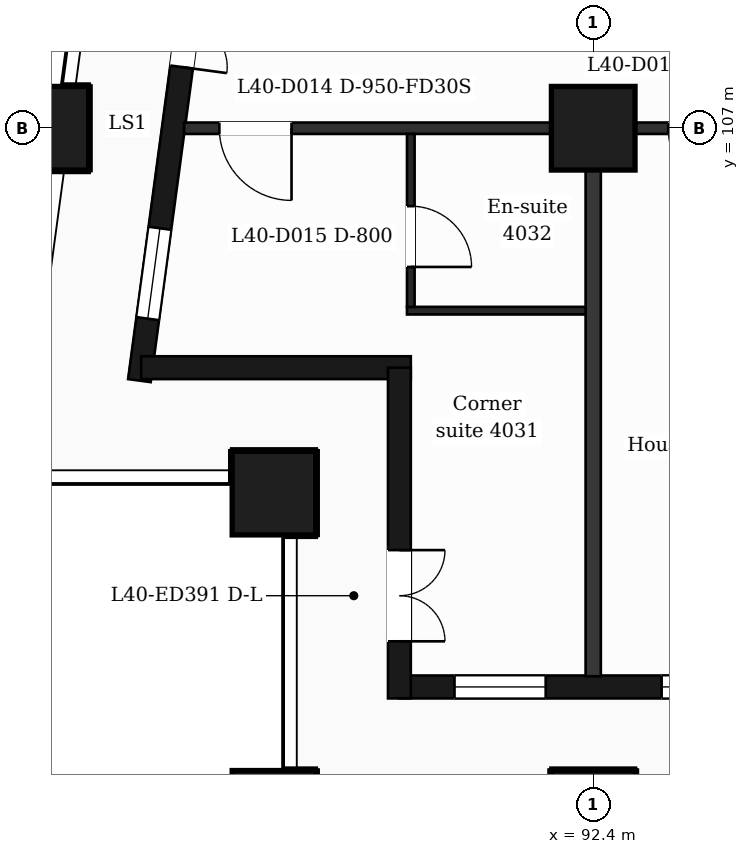
"""IFC4 building model, lengths in metres.
Left out: names, types, materials, properties, quantities, classifications, styles, units other than length and angle.
Written with IfcOpenShell. Run it as: python <this file> out.ifc"""

import sys

from ifc_helpers import new_model, si_unit, direction, frame, frame_2d, origin, origin_2d, place, context, subcontext, project, spatial, rectangle, extrude, element, fill, save


model = new_model("IFC4")
c1 = context("Model", 3, precision=1e-05, world=origin(), true_north=direction((0.0, 1.0)))
c2 = subcontext(c1, "Body", "Model", "MODEL_VIEW")
j1 = project(units=[si_unit("LENGTHUNIT", "METRE"), si_unit("PLANEANGLEUNIT", "RADIAN")], contexts=[c1])
p1 = place(None, origin())
s1 = spatial("IfcSite", under=j1, at=p1, CompositionType="ELEMENT")
p2 = place(p1, origin())
s2 = spatial("IfcBuilding", under=s1, at=p2, CompositionType="ELEMENT")
p3 = place(p2, frame((0.0, 0.0, 170.0)))
s3 = spatial("IfcBuildingStorey", under=s2, at=p3, CompositionType="ELEMENT", Elevation=170.0)
for number, where, z_axis, x_axis in (
    (1, (92.4, 98.0, 0.0), (0.0, 0.0, 1.0), (1.0, 0.0, 0.0)),
    (2, (88.2, 98.0, 0.0), (0.0, 0.0, 1.0), (1.0, 0.0, 0.0)),
    (3, (88.2, 102.2, 0.0), (0.0, 0.0, 1.0), (1.0, 0.0, 0.0)),
    (4, (92.4, 107.0, 0.0), (0.0, 0.0, 1.0), (1.0, 0.0, 0.0)),
    (5, (85.211, 107.0, 0.0), (0.0, 0.0, 1.0), (1.0, 0.0, 0.0)),
):
    element("IfcColumn", number, at=place(p3, frame(where, z_axis=z_axis, x_axis=x_axis)), inside=s3, PredefinedType="COLUMN", context=c2, shape_type="SweptSolid", body=[
        extrude(rectangle(XDim=1.1, YDim=1.1, at=origin_2d()), origin(), (0.0, 0.0, 1.0), 3.7),
    ])
p4 = place(p3, frame((89.85, 99.65, 0.0), z_axis=(0.0, 0.0, 1.0), x_axis=(1.0, 0.0, 0.0)))
e6 = element("IfcWall", 6, at=p4, inside=s3, PredefinedType="SOLIDWALL", context=c2, shape_type="SweptSolid", body=[
    extrude(rectangle(XDim=47.25, YDim=0.3, at=frame_2d((23.625, 0.0))), origin(), (0.0, 0.0, 1.0), 3.38),
])
p5 = place(p4, frame((0.725, 0.0, 0.9)))
e7 = element("IfcOpeningElement", 7, at=p5, cuts=e6, PredefinedType="OPENING", context=c2, shape_type="SweptSolid", body=[
    extrude(rectangle(XDim=1.2, YDim=2.1, at=frame_2d((0.6, 1.05))), frame((0.0, 0.16, 0.0), z_axis=(0.0, -1.0, 0.0), x_axis=(1.0, 0.0, 0.0)), (0.0, 0.0, 1.0), 0.32),
])
p6 = place(p4, frame((3.45, 0.0, 0.9)))
e8 = element("IfcOpeningElement", 8, at=p6, cuts=e6, PredefinedType="OPENING", context=c2, shape_type="SweptSolid", body=[
    extrude(rectangle(XDim=2.4, YDim=2.1, at=frame_2d((1.2, 1.05))), frame((0.0, 0.16, 0.0), z_axis=(0.0, -1.0, 0.0), x_axis=(1.0, 0.0, 0.0)), (0.0, 0.0, 1.0), 0.32),
])
p7 = place(p4, frame((7.65, 0.0, 0.9)))
e9 = element("IfcOpeningElement", 9, at=p7, cuts=e6, PredefinedType="OPENING", context=c2, shape_type="SweptSolid", body=[
    extrude(rectangle(XDim=2.4, YDim=2.1, at=frame_2d((1.2, 1.05))), frame((0.0, 0.16, 0.0), z_axis=(0.0, -1.0, 0.0), x_axis=(1.0, 0.0, 0.0)), (0.0, 0.0, 1.0), 0.32),
])
p8 = place(p4, frame((12.45, 0.0, 0.9)))
e10 = element("IfcOpeningElement", 10, at=p8, cuts=e6, PredefinedType="OPENING", context=c2, shape_type="SweptSolid", body=[
    extrude(rectangle(XDim=1.2, YDim=2.1, at=frame_2d((0.6, 1.05))), frame((0.0, 0.16, 0.0), z_axis=(0.0, -1.0, 0.0), x_axis=(1.0, 0.0, 0.0)), (0.0, 0.0, 1.0), 0.32),
])
p9 = place(p4, frame((16.65, 0.0, 0.9)))
e11 = element("IfcOpeningElement", 11, at=p9, cuts=e6, PredefinedType="OPENING", context=c2, shape_type="SweptSolid", body=[
    extrude(rectangle(XDim=1.2, YDim=2.1, at=frame_2d((0.6, 1.05))), frame((0.0, 0.16, 0.0), z_axis=(0.0, -1.0, 0.0), x_axis=(1.0, 0.0, 0.0)), (0.0, 0.0, 1.0), 0.32),
])
p10 = place(p4, frame((19.95, 0.0, 0.0)))
e12 = element("IfcOpeningElement", 12, at=p10, cuts=e6, PredefinedType="OPENING", context=c2, shape_type="SweptSolid", body=[
    extrude(rectangle(XDim=1.2, YDim=2.4, at=frame_2d((0.6, 1.2))), frame((0.0, 0.16, 0.0), z_axis=(0.0, -1.0, 0.0), x_axis=(1.0, 0.0, 0.0)), (0.0, 0.0, 1.0), 0.32),
])
p11 = place(p4, frame((21.75, 0.0, 0.9)))
e13 = element("IfcOpeningElement", 13, at=p11, cuts=e6, PredefinedType="OPENING", context=c2, shape_type="SweptSolid", body=[
    extrude(rectangle(XDim=1.2, YDim=2.1, at=frame_2d((0.6, 1.05))), frame((0.0, 0.16, 0.0), z_axis=(0.0, -1.0, 0.0), x_axis=(1.0, 0.0, 0.0)), (0.0, 0.0, 1.0), 0.32),
])
p12 = place(p4, frame((24.45, 0.0, 0.9)))
e14 = element("IfcOpeningElement", 14, at=p12, cuts=e6, PredefinedType="OPENING", context=c2, shape_type="SweptSolid", body=[
    extrude(rectangle(XDim=2.4, YDim=2.1, at=frame_2d((1.2, 1.05))), frame((0.0, 0.16, 0.0), z_axis=(0.0, -1.0, 0.0), x_axis=(1.0, 0.0, 0.0)), (0.0, 0.0, 1.0), 0.32),
])
p13 = place(p4, frame((28.35, 0.0, 0.0)))
e15 = element("IfcOpeningElement", 15, at=p13, cuts=e6, PredefinedType="OPENING", context=c2, shape_type="SweptSolid", body=[
    extrude(rectangle(XDim=1.2, YDim=2.4, at=frame_2d((0.6, 1.2))), frame((0.0, 0.16, 0.0), z_axis=(0.0, -1.0, 0.0), x_axis=(1.0, 0.0, 0.0)), (0.0, 0.0, 1.0), 0.32),
])
p14 = place(p4, frame((30.15, 0.0, 0.9)))
e16 = element("IfcOpeningElement", 16, at=p14, cuts=e6, PredefinedType="OPENING", context=c2, shape_type="SweptSolid", body=[
    extrude(rectangle(XDim=1.2, YDim=2.1, at=frame_2d((0.6, 1.05))), frame((0.0, 0.16, 0.0), z_axis=(0.0, -1.0, 0.0), x_axis=(1.0, 0.0, 0.0)), (0.0, 0.0, 1.0), 0.32),
])
p15 = place(p4, frame((32.85, 0.0, 0.9)))
e17 = element("IfcOpeningElement", 17, at=p15, cuts=e6, PredefinedType="OPENING", context=c2, shape_type="SweptSolid", body=[
    extrude(rectangle(XDim=2.4, YDim=2.1, at=frame_2d((1.2, 1.05))), frame((0.0, 0.16, 0.0), z_axis=(0.0, -1.0, 0.0), x_axis=(1.0, 0.0, 0.0)), (0.0, 0.0, 1.0), 0.32),
])
p16 = place(p4, frame((37.05, 0.0, 0.9)))
e18 = element("IfcOpeningElement", 18, at=p16, cuts=e6, PredefinedType="OPENING", context=c2, shape_type="SweptSolid", body=[
    extrude(rectangle(XDim=2.4, YDim=2.1, at=frame_2d((1.2, 1.05))), frame((0.0, 0.16, 0.0), z_axis=(0.0, -1.0, 0.0), x_axis=(1.0, 0.0, 0.0)), (0.0, 0.0, 1.0), 0.32),
])
p17 = place(p4, frame((41.85, 0.0, 0.9)))
e19 = element("IfcOpeningElement", 19, at=p17, cuts=e6, PredefinedType="OPENING", context=c2, shape_type="SweptSolid", body=[
    extrude(rectangle(XDim=1.2, YDim=2.1, at=frame_2d((0.6, 1.05))), frame((0.0, 0.16, 0.0), z_axis=(0.0, -1.0, 0.0), x_axis=(1.0, 0.0, 0.0)), (0.0, 0.0, 1.0), 0.32),
])
p18 = place(p4, frame((45.25, 0.0, 0.9)))
e20 = element("IfcOpeningElement", 20, at=p18, cuts=e6, PredefinedType="OPENING", context=c2, shape_type="SweptSolid", body=[
    extrude(rectangle(XDim=1.2, YDim=2.1, at=frame_2d((0.6, 1.05))), frame((0.0, 0.16, 0.0), z_axis=(0.0, -1.0, 0.0), x_axis=(1.0, 0.0, 0.0)), (0.0, 0.0, 1.0), 0.32),
])
p19 = place(p3, frame((87.334, 110.4, 0.0), z_axis=(0.0, 0.0, 1.0), x_axis=(-0.133437175554, -0.991057273915, 0.0)))
e21 = element("IfcWall", 21, at=p19, inside=s3, PredefinedType="SOLIDWALL", context=c2, shape_type="SweptSolid", body=[
    extrude(rectangle(XDim=6.781, YDim=0.3, at=frame_2d((3.39, 0.0))), origin(), (0.0, 0.0, 1.0), 3.38),
])
p20 = place(p19, frame((1.418, 0.0, 0.0)))
e22 = element("IfcOpeningElement", 22, at=p20, cuts=e21, PredefinedType="OPENING", context=c2, shape_type="SweptSolid", body=[
    extrude(rectangle(XDim=1.2, YDim=2.4, at=frame_2d((0.6, 1.2))), frame((0.0, 0.16, 0.0), z_axis=(0.0, -1.0, 0.0), x_axis=(1.0, 0.0, 0.0)), (0.0, 0.0, 1.0), 0.32),
])
p21 = place(p19, frame((4.758, 0.0, 0.9)))
e23 = element("IfcOpeningElement", 23, at=p21, cuts=e21, PredefinedType="OPENING", context=c2, shape_type="SweptSolid", body=[
    extrude(rectangle(XDim=1.2, YDim=2.1, at=frame_2d((0.6, 1.05))), frame((0.0, 0.16, 0.0), z_axis=(0.0, -1.0, 0.0), x_axis=(1.0, 0.0, 0.0)), (0.0, 0.0, 1.0), 0.32),
])
p22 = place(p3, frame((86.452, 103.85, 0.0), z_axis=(0.0, 0.0, 1.0), x_axis=(1.0, 0.0, 0.0)))
e24 = element("IfcWall", 24, at=p22, inside=s3, PredefinedType="SOLIDWALL", context=c2, shape_type="SweptSolid", body=[
    extrude(rectangle(XDim=3.548, YDim=0.3, at=frame_2d((1.774, 0.0))), origin(), (0.0, 0.0, 1.0), 3.38),
])
p23 = place(p3, frame((89.85, 103.85, 0.0), z_axis=(0.0, 0.0, 1.0), x_axis=(0.0, -1.0, 0.0)))
e25 = element("IfcWall", 25, at=p23, inside=s3, PredefinedType="SOLIDWALL", context=c2, shape_type="SweptSolid", body=[
    extrude(rectangle(XDim=4.35, YDim=0.3, at=frame_2d((2.175, 0.0))), origin(), (0.0, 0.0, 1.0), 3.38),
])
p24 = place(p23, frame((2.4, 0.0, 0.0)))
e26 = element("IfcOpeningElement", 26, at=p24, cuts=e25, PredefinedType="OPENING", context=c2, shape_type="SweptSolid", body=[
    extrude(rectangle(XDim=1.2, YDim=2.4, at=frame_2d((0.6, 1.2))), frame((0.0, 0.16, 0.0), z_axis=(0.0, -1.0, 0.0), x_axis=(1.0, 0.0, 0.0)), (0.0, 0.0, 1.0), 0.32),
])
p25 = place(p3, frame((89.95, 104.6, 0.0), z_axis=(0.0, 0.0, 1.0), x_axis=(1.0, 0.0, 0.0)))
e27 = element("IfcWall", 27, at=p25, inside=s3, PredefinedType="PARTITIONING", context=c2, shape_type="SweptSolid", body=[
    extrude(rectangle(XDim=2.45, YDim=0.1, at=frame_2d((1.225, 0.0))), origin(), (0.0, 0.0, 1.0), 3.38),
])
p26 = place(p3, frame((87.018, 107.0, 0.0), z_axis=(0.0, 0.0, 1.0), x_axis=(1.0, 0.0, 0.0)))
e28 = element("IfcWall", 28, at=p26, inside=s3, PredefinedType="PARTITIONING", context=c2, shape_type="SweptSolid", body=[
    extrude(rectangle(XDim=52.765, YDim=0.15, at=frame_2d((26.382, 0.0))), origin(), (0.0, 0.0, 1.0), 3.38),
])
p27 = place(p26, frame((0.463, 0.0, 0.0)))
e29 = element("IfcOpeningElement", 29, at=p27, cuts=e28, PredefinedType="OPENING", context=c2, shape_type="SweptSolid", body=[
    extrude(rectangle(XDim=0.95, YDim=2.1, at=frame_2d((0.475, 1.05))), frame((0.0, 0.085, 0.0), z_axis=(0.0, -1.0, 0.0), x_axis=(1.0, 0.0, 0.0)), (0.0, 0.0, 1.0), 0.17),
])
p28 = place(p26, frame((6.369, 0.0, 0.0)))
e30 = element("IfcOpeningElement", 30, at=p28, cuts=e28, PredefinedType="OPENING", context=c2, shape_type="SweptSolid", body=[
    extrude(rectangle(XDim=0.95, YDim=2.1, at=frame_2d((0.475, 1.05))), frame((0.0, 0.085, 0.0), z_axis=(0.0, -1.0, 0.0), x_axis=(1.0, 0.0, 0.0)), (0.0, 0.0, 1.0), 0.17),
])
p29 = place(p26, frame((9.857, 0.0, 0.0)))
e31 = element("IfcOpeningElement", 31, at=p29, cuts=e28, PredefinedType="OPENING", context=c2, shape_type="SweptSolid", body=[
    extrude(rectangle(XDim=0.95, YDim=2.1, at=frame_2d((0.475, 1.05))), frame((0.0, 0.085, 0.0), z_axis=(0.0, -1.0, 0.0), x_axis=(1.0, 0.0, 0.0)), (0.0, 0.0, 1.0), 0.17),
])
p30 = place(p26, frame((15.382, 0.0, 0.0)))
e32 = element("IfcOpeningElement", 32, at=p30, cuts=e28, PredefinedType="OPENING", context=c2, shape_type="SweptSolid", body=[
    extrude(rectangle(XDim=1.0, YDim=2.1, at=frame_2d((0.5, 1.05))), frame((0.0, 0.085, 0.0), z_axis=(0.0, -1.0, 0.0), x_axis=(1.0, 0.0, 0.0)), (0.0, 0.0, 1.0), 0.17),
])
p31 = place(p26, frame((24.932, 0.0, 0.0)))
e33 = element("IfcOpeningElement", 33, at=p31, cuts=e28, PredefinedType="OPENING", context=c2, shape_type="SweptSolid", body=[
    extrude(rectangle(XDim=1.0, YDim=2.1, at=frame_2d((0.5, 1.05))), frame((0.0, 0.085, 0.0), z_axis=(0.0, -1.0, 0.0), x_axis=(1.0, 0.0, 0.0)), (0.0, 0.0, 1.0), 0.17),
])
p32 = place(p26, frame((27.819, 0.0, 0.0)))
e34 = element("IfcOpeningElement", 34, at=p32, cuts=e28, PredefinedType="OPENING", context=c2, shape_type="SweptSolid", body=[
    extrude(rectangle(XDim=0.95, YDim=2.1, at=frame_2d((0.475, 1.05))), frame((0.0, 0.085, 0.0), z_axis=(0.0, -1.0, 0.0), x_axis=(1.0, 0.0, 0.0)), (0.0, 0.0, 1.0), 0.17),
])
p33 = place(p26, frame((42.012, 0.0, 0.0)))
e35 = element("IfcOpeningElement", 35, at=p33, cuts=e28, PredefinedType="OPENING", context=c2, shape_type="SweptSolid", body=[
    extrude(rectangle(XDim=1.0, YDim=2.1, at=frame_2d((0.5, 1.05))), frame((0.0, 0.085, 0.0), z_axis=(0.0, -1.0, 0.0), x_axis=(1.0, 0.0, 0.0)), (0.0, 0.0, 1.0), 0.17),
])
p34 = place(p26, frame((48.249, 0.0, 0.0)))
e36 = element("IfcOpeningElement", 36, at=p34, cuts=e28, PredefinedType="OPENING", context=c2, shape_type="SweptSolid", body=[
    extrude(rectangle(XDim=0.95, YDim=2.1, at=frame_2d((0.475, 1.05))), frame((0.0, 0.085, 0.0), z_axis=(0.0, -1.0, 0.0), x_axis=(1.0, 0.0, 0.0)), (0.0, 0.0, 1.0), 0.17),
])
p35 = place(p3, frame((90.0, 104.65, 0.0), z_axis=(0.0, 0.0, 1.0), x_axis=(0.0, 1.0, 0.0)))
e37 = element("IfcWall", 37, at=p35, inside=s3, PredefinedType="PARTITIONING", context=c2, shape_type="SweptSolid", body=[
    extrude(rectangle(XDim=2.275, YDim=0.1, at=frame_2d((1.138, 0.0))), origin(), (0.0, 0.0, 1.0), 3.38),
])
p36 = place(p35, frame((0.525, 0.0, 0.0)))
e38 = element("IfcOpeningElement", 38, at=p36, cuts=e37, PredefinedType="OPENING", context=c2, shape_type="SweptSolid", body=[
    extrude(rectangle(XDim=0.8, YDim=2.1, at=frame_2d((0.4, 1.05))), frame((0.0, 0.06, 0.0), z_axis=(0.0, -1.0, 0.0), x_axis=(1.0, 0.0, 0.0)), (0.0, 0.0, 1.0), 0.12),
])
p37 = place(p3, frame((92.4, 99.79, 0.0), z_axis=(0.0, 0.0, 1.0), x_axis=(0.0, 1.0, 0.0)))
e39 = element("IfcWall", 39, at=p37, inside=s3, PredefinedType="PARTITIONING", context=c2, shape_type="SweptSolid", body=[
    extrude(rectangle(XDim=7.135, YDim=0.2, at=frame_2d((3.567, 0.0))), origin(), (0.0, 0.0, 1.0), 3.38),
])
p38 = place(p5, origin())
e40 = element("IfcWindow", 40, at=p38, inside=s3, PartitioningType="SINGLE_PANEL", PredefinedType="WINDOW", context=c2, shape_type="SweptSolid", body=[
    extrude(rectangle(XDim=1.2, YDim=2.1, at=frame_2d((0.6, 1.05))), frame((0.0, 0.03, 0.0), z_axis=(0.0, -1.0, 0.0), x_axis=(1.0, 0.0, 0.0)), (0.0, 0.0, 1.0), 0.06),
])
fill(e7, e40)
p39 = place(p6, origin())
e41 = element("IfcWindow", 41, at=p39, inside=s3, PartitioningType="SINGLE_PANEL", PredefinedType="WINDOW", context=c2, shape_type="SweptSolid", body=[
    extrude(rectangle(XDim=2.4, YDim=2.1, at=frame_2d((1.2, 1.05))), frame((0.0, 0.03, 0.0), z_axis=(0.0, -1.0, 0.0), x_axis=(1.0, 0.0, 0.0)), (0.0, 0.0, 1.0), 0.06),
])
fill(e8, e41)
p40 = place(p20, origin())
e42 = element("IfcDoor", 42, at=p40, inside=s3, OperationType="DOUBLE_DOOR_SINGLE_SWING", PredefinedType="DOOR", context=c2, shape_type="SweptSolid", body=[
    extrude(rectangle(XDim=1.2, YDim=2.4, at=frame_2d((0.6, 1.2))), frame((0.0, 0.025, 0.0), z_axis=(0.0, -1.0, 0.0), x_axis=(1.0, 0.0, 0.0)), (0.0, 0.0, 1.0), 0.05),
])
fill(e22, e42)
p41 = place(p21, origin())
e43 = element("IfcWindow", 43, at=p41, inside=s3, PartitioningType="SINGLE_PANEL", PredefinedType="WINDOW", context=c2, shape_type="SweptSolid", body=[
    extrude(rectangle(XDim=1.2, YDim=2.1, at=frame_2d((0.6, 1.05))), frame((0.0, 0.03, 0.0), z_axis=(0.0, -1.0, 0.0), x_axis=(1.0, 0.0, 0.0)), (0.0, 0.0, 1.0), 0.06),
])
fill(e23, e43)
p42 = place(p24, origin())
e44 = element("IfcDoor", 44, at=p42, inside=s3, OperationType="DOUBLE_DOOR_SINGLE_SWING", PredefinedType="DOOR", context=c2, shape_type="SweptSolid", body=[
    extrude(rectangle(XDim=1.2, YDim=2.4, at=frame_2d((0.6, 1.2))), frame((0.0, 0.025, 0.0), z_axis=(0.0, -1.0, 0.0), x_axis=(1.0, 0.0, 0.0)), (0.0, 0.0, 1.0), 0.05),
])
fill(e26, e44)
p43 = place(p27, origin())
e45 = element("IfcDoor", 45, at=p43, inside=s3, OperationType="SINGLE_SWING_RIGHT", PredefinedType="DOOR", context=c2, shape_type="SweptSolid", body=[
    extrude(rectangle(XDim=0.95, YDim=2.1, at=frame_2d((0.475, 1.05))), frame((0.0, 0.025, 0.0), z_axis=(0.0, -1.0, 0.0), x_axis=(1.0, 0.0, 0.0)), (0.0, 0.0, 1.0), 0.05),
])
fill(e29, e45)
p44 = place(p36, origin())
e46 = element("IfcDoor", 46, at=p44, inside=s3, OperationType="SINGLE_SWING_LEFT", PredefinedType="DOOR", context=c2, shape_type="SweptSolid", body=[
    extrude(rectangle(XDim=0.8, YDim=2.1, at=frame_2d((0.4, 1.05))), frame((0.0, 0.025, 0.0), z_axis=(0.0, -1.0, 0.0), x_axis=(1.0, 0.0, 0.0)), (0.0, 0.0, 1.0), 0.05),
])
fill(e38, e46)
p45 = place(p28, origin())
e47 = element("IfcDoor", 47, at=p45, inside=s3, OperationType="SINGLE_SWING_RIGHT", PredefinedType="DOOR", context=c2, shape_type="SweptSolid", body=[
    extrude(rectangle(XDim=0.95, YDim=2.1, at=frame_2d((0.475, 1.05))), frame((0.0, 0.025, 0.0), z_axis=(0.0, -1.0, 0.0), x_axis=(1.0, 0.0, 0.0)), (0.0, 0.0, 1.0), 0.05),
])
fill(e30, e47)
save(model, sys.argv[1])
